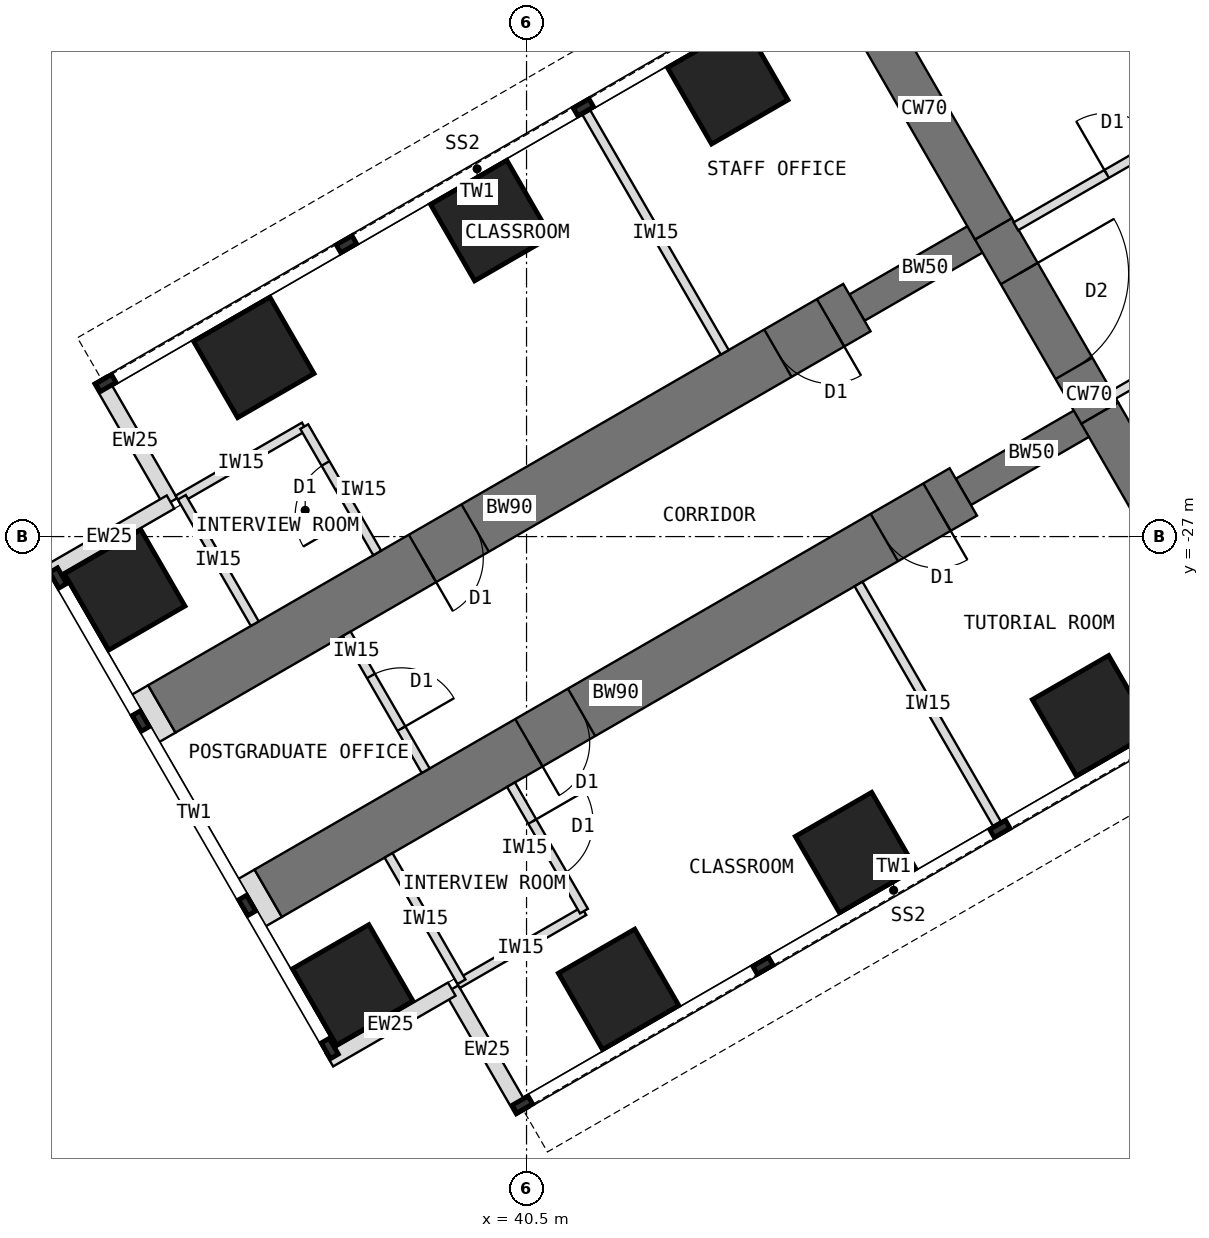
"""IFC4 building model, lengths in metres.
Left out: names, types, materials, properties, quantities, classifications, styles, units other than length and angle.
Written with IfcOpenShell. Run it as: python <this file> out.ifc"""

import sys

from ifc_helpers import new_model, si_unit, direction, frame, frame_2d, origin, origin_2d, place, context, subcontext, project, spatial, rectangle, extrude, element, fill, save


model = new_model("IFC4")
c1 = context("Model", 3, precision=1e-05, world=origin(), true_north=direction((0.0, 1.0)))
c2 = subcontext(c1, "Body", "Model", "MODEL_VIEW")
j1 = project(units=[si_unit("LENGTHUNIT", "METRE"), si_unit("PLANEANGLEUNIT", "RADIAN")], contexts=[c1])
p1 = place(None, origin())
s1 = spatial("IfcSite", under=j1, at=p1, CompositionType="ELEMENT")
p2 = place(p1, origin())
s2 = spatial("IfcBuilding", under=s1, at=p2, CompositionType="ELEMENT")
p3 = place(p2, frame((0.0, 0.0, 52.5)))
s3 = spatial("IfcBuildingStorey", under=s2, at=p3, CompositionType="ELEMENT", Elevation=52.5)
p4 = place(p3, frame((45.904, -18.0, 0.0), z_axis=(0.0, 0.0, 1.0), x_axis=(0.500024481964, -0.866011268655, 0.0)))
e1 = element("IfcWall", 1, at=p4, inside=s3, PredefinedType="SHEAR", context=c2, shape_type="SweptSolid", body=[
    extrude(rectangle(XDim=4.548, YDim=0.7, at=frame_2d((2.274, 0.0))), origin(), (0.0, 0.0, 1.0), 4.0),
])
p5 = place(p3, frame((48.178, -21.939, 0.0), z_axis=(0.0, 0.0, 1.0), x_axis=(0.500010275428, -0.866019471182, 0.0)))
e2 = element("IfcWall", 2, at=p5, inside=s3, PredefinedType="SHEAR", context=c2, shape_type="SweptSolid", body=[
    extrude(rectangle(XDim=3.5, YDim=0.7, at=frame_2d((1.75, 0.0))), origin(), (0.0, 0.0, 1.0), 4.0),
])
p6 = place(p5, frame((0.85, 0.0, 0.0)))
e3 = element("IfcOpeningElement", 3, at=p6, cuts=e2, PredefinedType="OPENING", context=c2, shape_type="SweptSolid", body=[
    extrude(rectangle(XDim=1.8, YDim=2.1, at=frame_2d((0.9, 1.05))), frame((0.0, 0.36, 0.0), z_axis=(0.0, -1.0, 0.0), x_axis=(1.0, 0.0, 0.0)), (0.0, 0.0, 1.0), 0.72),
])
p7 = place(p3, frame((49.928, -24.97, 0.0), z_axis=(0.0, 0.0, 1.0), x_axis=(0.499984222037, -0.866034513004, 0.0)))
e4 = element("IfcWall", 4, at=p7, inside=s3, PredefinedType="SHEAR", context=c2, shape_type="SweptSolid", body=[
    extrude(rectangle(XDim=4.548, YDim=0.7, at=frame_2d((2.274, 0.0))), origin(), (0.0, 0.0, 1.0), 4.0),
])
p8 = place(p3, frame((49.928, -24.97, 0.0), z_axis=(0.0, 0.0, 1.0), x_axis=(-0.866031863473, -0.499988811324, 0.0)))
e5 = element("IfcWall", 5, at=p8, inside=s3, PredefinedType="SHEAR", context=c2, shape_type="SweptSolid", body=[
    extrude(rectangle(XDim=2.592, YDim=0.5, at=frame_2d((1.296, 0.0))), origin(), (0.0, 0.0, 1.0), 4.0),
])
p9 = place(p3, frame((47.684, -26.266, 0.0), z_axis=(0.0, 0.0, 1.0), x_axis=(-0.866027579429, -0.499996231654, 0.0)))
e6 = element("IfcWall", 6, at=p9, inside=s3, PredefinedType="SHEAR", context=c2, shape_type="SweptSolid", body=[
    extrude(rectangle(XDim=13.2, YDim=0.9, at=frame_2d((6.6, 0.0))), origin(), (0.0, 0.0, 1.0), 4.0),
])
p10 = place(p9, frame((0.5, 0.0, 0.0)))
e7 = element("IfcOpeningElement", 7, at=p10, cuts=e6, PredefinedType="OPENING", context=c2, shape_type="SweptSolid", body=[
    extrude(rectangle(XDim=1.0, YDim=2.1, at=frame_2d((0.5, 1.05))), frame((0.0, 0.46, 0.0), z_axis=(0.0, -1.0, 0.0), x_axis=(1.0, 0.0, 0.0)), (0.0, 0.0, 1.0), 0.92),
])
p11 = place(p9, frame((7.25, 0.0, 0.0)))
e8 = element("IfcOpeningElement", 8, at=p11, cuts=e6, PredefinedType="OPENING", context=c2, shape_type="SweptSolid", body=[
    extrude(rectangle(XDim=1.0, YDim=2.1, at=frame_2d((0.5, 1.05))), frame((0.0, 0.46, 0.0), z_axis=(0.0, -1.0, 0.0), x_axis=(1.0, 0.0, 0.0)), (0.0, 0.0, 1.0), 0.92),
])
p12 = place(p3, frame((48.178, -21.939, 0.0), z_axis=(0.0, 0.0, 1.0), x_axis=(-0.866072649678, -0.499918158782, 0.0)))
e9 = element("IfcWall", 9, at=p12, inside=s3, PredefinedType="SHEAR", context=c2, shape_type="SweptSolid", body=[
    extrude(rectangle(XDim=2.592, YDim=0.5, at=frame_2d((1.296, 0.0))), origin(), (0.0, 0.0, 1.0), 4.0),
])
p13 = place(p3, frame((45.934, -23.234, 0.0), z_axis=(0.0, 0.0, 1.0), x_axis=(-0.866019570528, -0.500010103361, 0.0)))
e10 = element("IfcWall", 10, at=p13, inside=s3, PredefinedType="SHEAR", context=c2, shape_type="SweptSolid", body=[
    extrude(rectangle(XDim=13.2, YDim=0.9, at=frame_2d((6.6, 0.0))), origin(), (0.0, 0.0, 1.0), 4.0),
])
p14 = place(p13, frame((0.5, 0.0, 0.0)))
e11 = element("IfcOpeningElement", 11, at=p14, cuts=e10, PredefinedType="OPENING", context=c2, shape_type="SweptSolid", body=[
    extrude(rectangle(XDim=1.0, YDim=2.1, at=frame_2d((0.5, 1.05))), frame((0.0, 0.46, 0.0), z_axis=(0.0, -1.0, 0.0), x_axis=(1.0, 0.0, 0.0)), (0.0, 0.0, 1.0), 0.92),
])
p15 = place(p13, frame((7.25, 0.0, 0.0)))
e12 = element("IfcOpeningElement", 12, at=p15, cuts=e10, PredefinedType="OPENING", context=c2, shape_type="SweptSolid", body=[
    extrude(rectangle(XDim=1.0, YDim=2.1, at=frame_2d((0.5, 1.05))), frame((0.0, 0.46, 0.0), z_axis=(0.0, -1.0, 0.0), x_axis=(1.0, 0.0, 0.0)), (0.0, 0.0, 1.0), 0.92),
])
for number, where, z_axis, x_axis in (
    (13, (49.809, -29.946, 0.0), (0.0, 0.0, 1.0), (0.866, 0.5, 0.0)),
    (14, (43.809, -19.554, 0.0), (0.0, 0.0, 1.0), (0.866, 0.5, 0.0)),
    (15, (45.912, -32.196, 0.0), (0.0, 0.0, 1.0), (0.866, 0.5, 0.0)),
    (16, (39.912, -21.804, 0.0), (0.0, 0.0, 1.0), (0.866, 0.5, 0.0)),
    (17, (42.014, -34.446, 0.0), (0.0, 0.0, 1.0), (0.866, 0.5, 0.0)),
    (18, (36.014, -24.054, 0.0), (0.0, 0.0, 1.0), (0.866, 0.5, 0.0)),
    (19, (37.642, -34.373, 0.0), (0.0, 0.0, 1.0), (0.866, 0.5, 0.0)),
    (20, (33.892, -27.877, 0.0), (0.0, 0.0, 1.0), (0.866, 0.5, 0.0)),
):
    element("IfcColumn", number, at=place(p3, frame(where, z_axis=z_axis, x_axis=x_axis)), inside=s3, PredefinedType="COLUMN", context=c2, shape_type="SweptSolid", body=[
        extrude(rectangle(XDim=1.45, YDim=1.45, at=origin_2d()), origin(), (0.0, 0.0, 1.0), 4.0),
    ])
for number, where, z_axis, x_axis in (
    (21, (40.433, -36.456, 0.0), (0.0, 0.0, 1.0), (-0.5, 0.866, 0.0)),
    (22, (39.27, -34.443, 0.0), (0.0, 0.0, 1.0), (-0.866, -0.5, 0.0)),
    (23, (33.483, -24.419, 0.0), (0.0, 0.0, 1.0), (0.5, -0.866, 0.0)),
    (24, (34.645, -26.432, 0.0), (0.0, 0.0, 1.0), (-0.866, -0.5, 0.0)),
):
    element("IfcWall", number, at=place(p3, frame(where, z_axis=z_axis, x_axis=x_axis)), inside=s3, PredefinedType="STANDARD", context=c2, shape_type="SweptSolid", body=[
        extrude(rectangle(XDim=2.325, YDim=0.25, at=frame_2d((1.163, 0.0))), origin(), (0.0, 0.0, 1.0), 3.8),
    ])
for number, where, z_axis, x_axis in (
    (25, (36.252, -32.865, 0.0), (0.0, 0.0, 1.0), (-0.866, -0.5, 0.0)),
    (26, (34.502, -29.834, 0.0), (0.0, 0.0, 1.0), (-0.866, -0.5, 0.0)),
):
    element("IfcWall", number, at=place(p3, frame(where, z_axis=z_axis, x_axis=x_axis)), inside=s3, PredefinedType="PARTITIONING", context=c2, shape_type="SweptSolid", body=[
        extrude(rectangle(XDim=0.31, YDim=0.9, at=frame_2d((0.155, 0.0))), origin(), (0.0, 0.0, 1.0), 3.8),
    ])
p16 = place(p3, frame((52.38, -19.201, 0.0), z_axis=(0.0, 0.0, 1.0), x_axis=(-0.866023886965, 0.500002627198, 0.0)))
e27 = element("IfcWall", 27, at=p16, inside=s3, PredefinedType="SHEAR", context=c2, shape_type="SweptSolid", body=[
    extrude(rectangle(XDim=5.858, YDim=0.4, at=frame_2d((2.929, 0.0))), origin(), (0.0, 0.0, 1.0), 4.0),
])
p17 = place(p3, frame((45.96, -27.78, 0.0), z_axis=(0.0, 0.0, 1.0), x_axis=(0.499982560684, -0.866035472144, 0.0)))
e28 = element("IfcWall", 28, at=p17, inside=s3, PredefinedType="PARTITIONING", context=c2, shape_type="SweptSolid", body=[
    extrude(rectangle(XDim=4.55, YDim=0.15, at=frame_2d((2.275, 0.0))), origin(), (0.0, 0.0, 1.0), 3.8),
])
p18 = place(p3, frame((41.444, -33.159, 0.0), z_axis=(0.0, 0.0, 1.0), x_axis=(-0.866024647952, -0.500001309137, 0.0)))
e29 = element("IfcWall", 29, at=p18, inside=s3, PredefinedType="PARTITIONING", context=c2, shape_type="SweptSolid", body=[
    extrude(rectangle(XDim=2.4, YDim=0.15, at=frame_2d((1.2, 0.0))), origin(), (0.0, 0.0, 1.0), 3.8),
])
p19 = place(p3, frame((40.244, -31.08, 0.0), z_axis=(0.0, 0.0, 1.0), x_axis=(0.500001309137, -0.866024647952, 0.0)))
e30 = element("IfcWall", 30, at=p19, inside=s3, PredefinedType="PARTITIONING", context=c2, shape_type="SweptSolid", body=[
    extrude(rectangle(XDim=2.4, YDim=0.15, at=frame_2d((1.2, 0.0))), origin(), (0.0, 0.0, 1.0), 3.8),
])
p20 = place(p19, frame((0.7, 0.0, 0.0)))
e31 = element("IfcOpeningElement", 31, at=p20, cuts=e30, PredefinedType="OPENING", context=c2, shape_type="SweptSolid", body=[
    extrude(rectangle(XDim=1.0, YDim=2.1, at=frame_2d((0.5, 1.05))), frame((0.0, 0.085, 0.0), z_axis=(0.0, -1.0, 0.0), x_axis=(1.0, 0.0, 0.0)), (0.0, 0.0, 1.0), 0.17),
])
p21 = place(p3, frame((38.231, -32.243, 0.0), z_axis=(0.0, 0.0, 1.0), x_axis=(0.500033551112, -0.866006032174, 0.0)))
e32 = element("IfcWall", 32, at=p21, inside=s3, PredefinedType="PARTITIONING", context=c2, shape_type="SweptSolid", body=[
    extrude(rectangle(XDim=2.4, YDim=0.15, at=frame_2d((1.2, 0.0))), origin(), (0.0, 0.0, 1.0), 3.8),
])
p22 = place(p3, frame((43.76, -23.97, 0.0), z_axis=(0.0, 0.0, 1.0), x_axis=(-0.499982560684, 0.866035472144, 0.0)))
e33 = element("IfcWall", 33, at=p22, inside=s3, PredefinedType="PARTITIONING", context=c2, shape_type="SweptSolid", body=[
    extrude(rectangle(XDim=4.55, YDim=0.15, at=frame_2d((2.275, 0.0))), origin(), (0.0, 0.0, 1.0), 3.8),
])
p23 = place(p3, frame((36.844, -25.191, 0.0), z_axis=(0.0, 0.0, 1.0), x_axis=(-0.865980596518, -0.500077600433, 0.0)))
e34 = element("IfcWall", 34, at=p23, inside=s3, PredefinedType="PARTITIONING", context=c2, shape_type="SweptSolid", body=[
    extrude(rectangle(XDim=2.4, YDim=0.15, at=frame_2d((1.2, 0.0))), origin(), (0.0, 0.0, 1.0), 3.8),
])
p24 = place(p3, frame((38.044, -27.27, 0.0), z_axis=(0.0, 0.0, 1.0), x_axis=(-0.500033551112, 0.866006032174, 0.0)))
e35 = element("IfcWall", 35, at=p24, inside=s3, PredefinedType="PARTITIONING", context=c2, shape_type="SweptSolid", body=[
    extrude(rectangle(XDim=2.4, YDim=0.15, at=frame_2d((1.2, 0.0))), origin(), (0.0, 0.0, 1.0), 3.8),
])
p25 = place(p24, frame((0.7, 0.0, 0.0)))
e36 = element("IfcOpeningElement", 36, at=p25, cuts=e35, PredefinedType="OPENING", context=c2, shape_type="SweptSolid", body=[
    extrude(rectangle(XDim=1.0, YDim=2.1, at=frame_2d((0.5, 1.05))), frame((0.0, 0.085, 0.0), z_axis=(0.0, -1.0, 0.0), x_axis=(1.0, 0.0, 0.0)), (0.0, 0.0, 1.0), 0.17),
])
p26 = place(p3, frame((36.031, -28.432, 0.0), z_axis=(0.0, 0.0, 1.0), x_axis=(-0.500001309137, 0.866024647952, 0.0)))
e37 = element("IfcWall", 37, at=p26, inside=s3, PredefinedType="PARTITIONING", context=c2, shape_type="SweptSolid", body=[
    extrude(rectangle(XDim=2.4, YDim=0.15, at=frame_2d((1.2, 0.0))), origin(), (0.0, 0.0, 1.0), 3.8),
])
p27 = place(p3, frame((54.017, -22.436, 0.0), z_axis=(0.0, 0.0, 1.0), x_axis=(-0.866015446554, -0.500017246033, 0.0)))
e38 = element("IfcWall", 38, at=p27, inside=s3, PredefinedType="PARTITIONING", context=c2, shape_type="SweptSolid", body=[
    extrude(rectangle(XDim=4.469, YDim=0.15, at=frame_2d((2.234, 0.0))), origin(), (0.0, 0.0, 1.0), 3.8),
])
p28 = place(p27, frame((1.744, 0.0, 0.0)))
e39 = element("IfcOpeningElement", 39, at=p28, cuts=e38, PredefinedType="OPENING", context=c2, shape_type="SweptSolid", body=[
    extrude(rectangle(XDim=1.0, YDim=2.1, at=frame_2d((0.5, 1.05))), frame((0.0, 0.085, 0.0), z_axis=(0.0, -1.0, 0.0), x_axis=(1.0, 0.0, 0.0)), (0.0, 0.0, 1.0), 0.17),
])
p29 = place(p3, frame((48.548, -21.898, 0.0), z_axis=(0.0, 0.0, 1.0), x_axis=(0.866025445582, 0.499999927604, 0.0)))
e40 = element("IfcWall", 40, at=p29, inside=s3, PredefinedType="PARTITIONING", context=c2, shape_type="SweptSolid", body=[
    extrude(rectangle(XDim=4.468, YDim=0.15, at=frame_2d((2.234, 0.0))), origin(), (0.0, 0.0, 1.0), 3.8),
])
p30 = place(p29, frame((1.724, 0.0, 0.0)))
e41 = element("IfcOpeningElement", 41, at=p30, cuts=e40, PredefinedType="OPENING", context=c2, shape_type="SweptSolid", body=[
    extrude(rectangle(XDim=1.0, YDim=2.1, at=frame_2d((0.5, 1.05))), frame((0.0, 0.085, 0.0), z_axis=(0.0, -1.0, 0.0), x_axis=(1.0, 0.0, 0.0)), (0.0, 0.0, 1.0), 0.17),
])
p31 = place(p3, frame((37.542, -28.599, 0.0), z_axis=(0.0, 0.0, 1.0), x_axis=(0.500006934395, -0.866021400173, 0.0)))
e42 = element("IfcWall", 42, at=p31, inside=s3, PredefinedType="PARTITIONING", context=c2, shape_type="SweptSolid", body=[
    extrude(rectangle(XDim=2.6, YDim=0.15, at=frame_2d((1.3, 0.0))), origin(), (0.0, 0.0, 1.0), 3.8),
])
p32 = place(p31, frame((0.8, 0.0, 0.0)))
e43 = element("IfcOpeningElement", 43, at=p32, cuts=e42, PredefinedType="OPENING", context=c2, shape_type="SweptSolid", body=[
    extrude(rectangle(XDim=1.0, YDim=2.1, at=frame_2d((0.5, 1.05))), frame((0.0, 0.085, 0.0), z_axis=(0.0, -1.0, 0.0), x_axis=(1.0, 0.0, 0.0)), (0.0, 0.0, 1.0), 0.17),
])
p33 = place(p6, origin())
e44 = element("IfcDoor", 44, at=p33, inside=s3, OperationType="DOUBLE_DOOR_DOUBLE_SWING", PredefinedType="DOOR", context=c2, shape_type="SweptSolid", body=[
    extrude(rectangle(XDim=1.72, YDim=2.06, at=frame_2d((0.9, 1.03))), frame((0.0, 0.025, 0.0), z_axis=(0.0, -1.0, 0.0), x_axis=(1.0, 0.0, 0.0)), (0.0, 0.0, 1.0), 0.05),
    extrude(rectangle(XDim=0.04, YDim=2.1, at=frame_2d((0.02, 1.05))), frame((0.0, 0.35, 0.0), z_axis=(0.0, -1.0, 0.0), x_axis=(1.0, 0.0, 0.0)), (0.0, 0.0, 1.0), 0.699),
    extrude(rectangle(XDim=0.04, YDim=2.1, at=frame_2d((1.78, 1.05))), frame((0.0, 0.35, 0.0), z_axis=(0.0, -1.0, 0.0), x_axis=(1.0, 0.0, 0.0)), (0.0, 0.0, 1.0), 0.699),
    extrude(rectangle(XDim=1.72, YDim=0.04, at=frame_2d((0.9, 2.08))), frame((0.0, 0.35, 0.0), z_axis=(0.0, -1.0, 0.0), x_axis=(1.0, 0.0, 0.0)), (0.0, 0.0, 1.0), 0.699),
])
fill(e3, e44)
p34 = place(p20, origin())
e45 = element("IfcDoor", 45, at=p34, inside=s3, OperationType="SINGLE_SWING_LEFT", PredefinedType="DOOR", context=c2, shape_type="SweptSolid", body=[
    extrude(rectangle(XDim=1.0, YDim=2.1, at=frame_2d((0.5, 1.05))), frame((0.0, 0.025, 0.0), z_axis=(0.0, -1.0, 0.0), x_axis=(1.0, 0.0, 0.0)), (0.0, 0.0, 1.0), 0.05),
])
fill(e31, e45)
p35 = place(p25, origin())
e46 = element("IfcDoor", 46, at=p35, inside=s3, OperationType="SINGLE_SWING_LEFT", PredefinedType="DOOR", context=c2, shape_type="SweptSolid", body=[
    extrude(rectangle(XDim=1.0, YDim=2.1, at=frame_2d((0.5, 1.05))), frame((0.0, 0.025, 0.0), z_axis=(0.0, -1.0, 0.0), x_axis=(1.0, 0.0, 0.0)), (0.0, 0.0, 1.0), 0.05),
])
fill(e36, e46)
p36 = place(p30, origin())
e47 = element("IfcDoor", 47, at=p36, inside=s3, OperationType="SINGLE_SWING_LEFT", PredefinedType="DOOR", context=c2, shape_type="SweptSolid", body=[
    extrude(rectangle(XDim=1.0, YDim=2.1, at=frame_2d((0.5, 1.05))), frame((0.0, 0.025, 0.0), z_axis=(0.0, -1.0, 0.0), x_axis=(1.0, 0.0, 0.0)), (0.0, 0.0, 1.0), 0.05),
])
fill(e41, e47)
p37 = place(p32, origin())
e48 = element("IfcDoor", 48, at=p37, inside=s3, OperationType="SINGLE_SWING_RIGHT", PredefinedType="DOOR", context=c2, shape_type="SweptSolid", body=[
    extrude(rectangle(XDim=1.0, YDim=2.1, at=frame_2d((0.5, 1.05))), frame((0.0, 0.025, 0.0), z_axis=(0.0, -1.0, 0.0), x_axis=(1.0, 0.0, 0.0)), (0.0, 0.0, 1.0), 0.05),
])
fill(e43, e48)
p38 = place(p10, origin())
e49 = element("IfcDoor", 49, at=p38, inside=s3, OperationType="SINGLE_SWING_LEFT", PredefinedType="DOOR", context=c2, shape_type="SweptSolid", body=[
    extrude(rectangle(XDim=0.92, YDim=2.06, at=frame_2d((0.5, 1.03))), frame((0.0, 0.025, 0.0), z_axis=(0.0, -1.0, 0.0), x_axis=(1.0, 0.0, 0.0)), (0.0, 0.0, 1.0), 0.05),
    extrude(rectangle(XDim=0.04, YDim=2.1, at=frame_2d((0.02, 1.05))), frame((0.0, 0.45, 0.0), z_axis=(0.0, -1.0, 0.0), x_axis=(1.0, 0.0, 0.0)), (0.0, 0.0, 1.0), 0.899),
    extrude(rectangle(XDim=0.04, YDim=2.1, at=frame_2d((0.98, 1.05))), frame((0.0, 0.45, 0.0), z_axis=(0.0, -1.0, 0.0), x_axis=(1.0, 0.0, 0.0)), (0.0, 0.0, 1.0), 0.899),
    extrude(rectangle(XDim=0.92, YDim=0.04, at=frame_2d((0.5, 2.08))), frame((0.0, 0.45, 0.0), z_axis=(0.0, -1.0, 0.0), x_axis=(1.0, 0.0, 0.0)), (0.0, 0.0, 1.0), 0.899),
])
fill(e7, e49)
p39 = place(p11, origin())
e50 = element("IfcDoor", 50, at=p39, inside=s3, OperationType="SINGLE_SWING_RIGHT", PredefinedType="DOOR", context=c2, shape_type="SweptSolid", body=[
    extrude(rectangle(XDim=0.92, YDim=2.06, at=frame_2d((0.5, 1.03))), frame((0.0, 0.025, 0.0), z_axis=(0.0, -1.0, 0.0), x_axis=(1.0, 0.0, 0.0)), (0.0, 0.0, 1.0), 0.05),
    extrude(rectangle(XDim=0.04, YDim=2.1, at=frame_2d((0.02, 1.05))), frame((0.0, 0.45, 0.0), z_axis=(0.0, -1.0, 0.0), x_axis=(1.0, 0.0, 0.0)), (0.0, 0.0, 1.0), 0.899),
    extrude(rectangle(XDim=0.04, YDim=2.1, at=frame_2d((0.98, 1.05))), frame((0.0, 0.45, 0.0), z_axis=(0.0, -1.0, 0.0), x_axis=(1.0, 0.0, 0.0)), (0.0, 0.0, 1.0), 0.899),
    extrude(rectangle(XDim=0.92, YDim=0.04, at=frame_2d((0.5, 2.08))), frame((0.0, 0.45, 0.0), z_axis=(0.0, -1.0, 0.0), x_axis=(1.0, 0.0, 0.0)), (0.0, 0.0, 1.0), 0.899),
])
fill(e8, e50)
p40 = place(p14, origin())
e51 = element("IfcDoor", 51, at=p40, inside=s3, OperationType="SINGLE_SWING_LEFT", PredefinedType="DOOR", context=c2, shape_type="SweptSolid", body=[
    extrude(rectangle(XDim=0.92, YDim=2.06, at=frame_2d((0.5, 1.03))), frame((0.0, 0.025, 0.0), z_axis=(0.0, -1.0, 0.0), x_axis=(1.0, 0.0, 0.0)), (0.0, 0.0, 1.0), 0.05),
    extrude(rectangle(XDim=0.04, YDim=2.1, at=frame_2d((0.02, 1.05))), frame((0.0, 0.45, 0.0), z_axis=(0.0, -1.0, 0.0), x_axis=(1.0, 0.0, 0.0)), (0.0, 0.0, 1.0), 0.899),
    extrude(rectangle(XDim=0.04, YDim=2.1, at=frame_2d((0.98, 1.05))), frame((0.0, 0.45, 0.0), z_axis=(0.0, -1.0, 0.0), x_axis=(1.0, 0.0, 0.0)), (0.0, 0.0, 1.0), 0.899),
    extrude(rectangle(XDim=0.92, YDim=0.04, at=frame_2d((0.5, 2.08))), frame((0.0, 0.45, 0.0), z_axis=(0.0, -1.0, 0.0), x_axis=(1.0, 0.0, 0.0)), (0.0, 0.0, 1.0), 0.899),
])
fill(e11, e51)
p41 = place(p15, origin())
e52 = element("IfcDoor", 52, at=p41, inside=s3, OperationType="SINGLE_SWING_RIGHT", PredefinedType="DOOR", context=c2, shape_type="SweptSolid", body=[
    extrude(rectangle(XDim=0.92, YDim=2.06, at=frame_2d((0.5, 1.03))), frame((0.0, 0.025, 0.0), z_axis=(0.0, -1.0, 0.0), x_axis=(1.0, 0.0, 0.0)), (0.0, 0.0, 1.0), 0.05),
    extrude(rectangle(XDim=0.04, YDim=2.1, at=frame_2d((0.02, 1.05))), frame((0.0, 0.45, 0.0), z_axis=(0.0, -1.0, 0.0), x_axis=(1.0, 0.0, 0.0)), (0.0, 0.0, 1.0), 0.899),
    extrude(rectangle(XDim=0.04, YDim=2.1, at=frame_2d((0.98, 1.05))), frame((0.0, 0.45, 0.0), z_axis=(0.0, -1.0, 0.0), x_axis=(1.0, 0.0, 0.0)), (0.0, 0.0, 1.0), 0.899),
    extrude(rectangle(XDim=0.92, YDim=0.04, at=frame_2d((0.5, 2.08))), frame((0.0, 0.45, 0.0), z_axis=(0.0, -1.0, 0.0), x_axis=(1.0, 0.0, 0.0)), (0.0, 0.0, 1.0), 0.899),
])
fill(e12, e52)
save(model, sys.argv[1])
